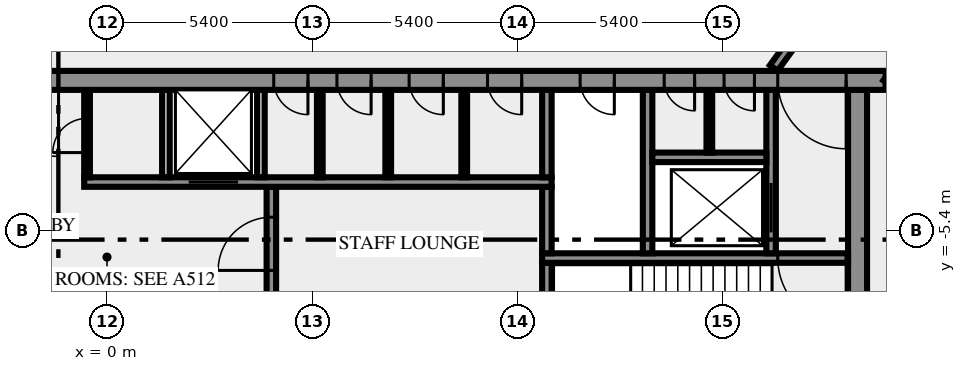
"""IFC4 building model, lengths in metres.
Left out: names, types, materials, properties, quantities, classifications, styles, units other than length and angle.
Written with IfcOpenShell. Run it as: python <this file> out.ifc"""

import sys

from ifc_helpers import new_model, si_unit, direction, frame, frame_2d, origin, place, context, subcontext, project, spatial, rectangle, extrude, element, fill, save


model = new_model("IFC4")
c1 = context("Model", 3, precision=1e-05, world=origin(), true_north=direction((0.0, 1.0)))
c2 = subcontext(c1, "Body", "Model", "MODEL_VIEW")
j1 = project(units=[si_unit("LENGTHUNIT", "METRE"), si_unit("PLANEANGLEUNIT", "RADIAN")], contexts=[c1])
p1 = place(None, origin())
s1 = spatial("IfcSite", under=j1, at=p1, CompositionType="ELEMENT")
p2 = place(p1, origin())
s2 = spatial("IfcBuilding", under=s1, at=p2, CompositionType="ELEMENT")
p3 = place(p2, frame((0.0, 0.0, 285.0)))
s3 = spatial("IfcBuildingStorey", under=s2, at=p3, CompositionType="ELEMENT", Elevation=285.0)
p4 = place(p3, frame((19.75, -10.5, 0.0), z_axis=(0.0, 0.0, 1.0), x_axis=(0.0, 1.0, 0.0)))
e1 = element("IfcWall", 1, at=p4, inside=s3, PredefinedType="SHEAR", context=c2, shape_type="SweptSolid", body=[
    extrude(rectangle(XDim=8.8, YDim=0.5, at=frame_2d((4.4, 0.0))), origin(), (0.0, 0.0, 1.0), 3.65),
])
p5 = place(p3, frame((4.325, -7.25, 0.0), z_axis=(0.0, 0.0, 1.0), x_axis=(0.0, 1.0, 0.0)))
e2 = element("IfcWall", 2, at=p5, inside=s3, PredefinedType="SHEAR", context=c2, shape_type="SweptSolid", body=[
    extrude(rectangle(XDim=3.0, YDim=0.25, at=frame_2d((1.5, 0.0))), origin(), (0.0, 0.0, 1.0), 3.65),
])
p6 = place(p5, frame((0.8, 0.0, 0.0)))
e3 = element("IfcOpeningElement", 3, at=p6, cuts=e2, PredefinedType="OPENING", context=c2, shape_type="SweptSolid", body=[
    extrude(rectangle(XDim=1.4, YDim=2.1, at=frame_2d((0.7, 1.05))), frame((0.0, 0.135, 0.0), z_axis=(0.0, -1.0, 0.0), x_axis=(1.0, 0.0, 0.0)), (0.0, 0.0, 1.0), 0.27),
])
p7 = place(p3, frame((11.575, -7.25, 0.0), z_axis=(0.0, 0.0, 1.0), x_axis=(0.0, 1.0, 0.0)))
e4 = element("IfcWall", 4, at=p7, inside=s3, PredefinedType="SHEAR", context=c2, shape_type="SweptSolid", body=[
    extrude(rectangle(XDim=1.0, YDim=0.25, at=frame_2d((0.5, 0.0))), origin(), (0.0, 0.0, 1.0), 3.65),
])
p8 = place(p3, frame((19.5, -6.125, 0.0), z_axis=(0.0, 0.0, 1.0), x_axis=(-1.0, 0.0, 0.0)))
e5 = element("IfcWall", 5, at=p8, inside=s3, PredefinedType="SHEAR", context=c2, shape_type="SweptSolid", body=[
    extrude(rectangle(XDim=8.05, YDim=0.25, at=frame_2d((4.025, 0.0))), origin(), (0.0, 0.0, 1.0), 3.65),
])
p9 = place(p8, frame((0.05, 0.0, 0.0)))
e6 = element("IfcOpeningElement", 6, at=p9, cuts=e5, PredefinedType="OPENING", context=c2, shape_type="SweptSolid", body=[
    extrude(rectangle(XDim=1.8, YDim=2.1, at=frame_2d((0.9, 1.05))), frame((0.0, 0.135, 0.0), z_axis=(0.0, -1.0, 0.0), x_axis=(1.0, 0.0, 0.0)), (0.0, 0.0, 1.0), 0.27),
])
p10 = place(p3, frame((11.575, -6.0, 0.0), z_axis=(0.0, 0.0, 1.0), x_axis=(0.0, 1.0, 0.0)))
e7 = element("IfcWall", 7, at=p10, inside=s3, PredefinedType="SHEAR", context=c2, shape_type="SweptSolid", body=[
    extrude(rectangle(XDim=1.75, YDim=0.25, at=frame_2d((0.875, 0.0))), origin(), (0.0, 0.0, 1.0), 3.65),
])
p11 = place(p3, frame((14.225, -6.0, 0.0), z_axis=(0.0, 0.0, 1.0), x_axis=(0.0, 1.0, 0.0)))
e8 = element("IfcWall", 8, at=p11, inside=s3, PredefinedType="SHEAR", context=c2, shape_type="SweptSolid", body=[
    extrude(rectangle(XDim=4.3, YDim=0.25, at=frame_2d((2.15, 0.0))), origin(), (0.0, 0.0, 1.0), 3.65),
])
p12 = place(p3, frame((17.475, -6.0, 0.0), z_axis=(0.0, 0.0, 1.0), x_axis=(0.0, 1.0, 0.0)))
e9 = element("IfcWall", 9, at=p12, inside=s3, PredefinedType="SHEAR", context=c2, shape_type="SweptSolid", body=[
    extrude(rectangle(XDim=4.3, YDim=0.25, at=frame_2d((2.15, 0.0))), origin(), (0.0, 0.0, 1.0), 3.65),
])
p13 = place(p12, frame((0.55, 0.0, 0.0)))
e10 = element("IfcOpeningElement", 10, at=p13, cuts=e9, PredefinedType="OPENING", context=c2, shape_type="SweptSolid", body=[
    extrude(rectangle(XDim=1.3, YDim=2.1, at=frame_2d((0.65, 1.05))), frame((0.0, 0.135, 0.0), z_axis=(0.0, -1.0, 0.0), x_axis=(1.0, 0.0, 0.0)), (0.0, 0.0, 1.0), 0.27),
])
p14 = place(p3, frame((-0.6, -4.125, 0.0), z_axis=(0.0, 0.0, 1.0), x_axis=(1.0, 0.0, 0.0)))
e11 = element("IfcWall", 11, at=p14, inside=s3, PredefinedType="SHEAR", context=c2, shape_type="SweptSolid", body=[
    extrude(rectangle(XDim=12.3, YDim=0.25, at=frame_2d((6.15, 0.0))), origin(), (0.0, 0.0, 1.0), 3.65),
])
p15 = place(p14, frame((2.75, 0.0, 0.0)))
e12 = element("IfcOpeningElement", 12, at=p15, cuts=e11, PredefinedType="OPENING", context=c2, shape_type="SweptSolid", body=[
    extrude(rectangle(XDim=1.3, YDim=2.1, at=frame_2d((0.65, 1.05))), frame((0.0, 0.135, 0.0), z_axis=(0.0, -1.0, 0.0), x_axis=(1.0, 0.0, 0.0)), (0.0, 0.0, 1.0), 0.27),
])
p16 = place(p3, frame((-0.525, -4.0, 0.0), z_axis=(0.0, 0.0, 1.0), x_axis=(0.0, 1.0, 0.0)))
e13 = element("IfcWall", 13, at=p16, inside=s3, PredefinedType="PARTITIONING", context=c2, shape_type="SweptSolid", body=[
    extrude(rectangle(XDim=2.3, YDim=0.15, at=frame_2d((1.15, 0.0))), origin(), (0.0, 0.0, 1.0), 3.65),
])
p17 = place(p16, frame((0.65, 0.0, 0.0)))
e14 = element("IfcOpeningElement", 14, at=p17, cuts=e13, PredefinedType="OPENING", context=c2, shape_type="SweptSolid", body=[
    extrude(rectangle(XDim=0.9, YDim=2.1, at=frame_2d((0.45, 1.05))), frame((0.0, 0.085, 0.0), z_axis=(0.0, -1.0, 0.0), x_axis=(1.0, 0.0, 0.0)), (0.0, 0.0, 1.0), 0.17),
])
for number, where, z_axis, x_axis in (
    (15, (1.55, -4.0, 0.0), (0.0, 0.0, 1.0), (0.0, 1.0, 0.0)),
    (16, (4.05, -4.0, 0.0), (0.0, 0.0, 1.0), (0.0, 1.0, 0.0)),
):
    element("IfcWall", number, at=place(p3, frame(where, z_axis=z_axis, x_axis=x_axis)), inside=s3, PredefinedType="SOLIDWALL", context=c2, shape_type="SweptSolid", body=[
        extrude(rectangle(XDim=2.3, YDim=0.2, at=frame_2d((1.15, 0.0))), origin(), (0.0, 0.0, 1.0), 3.65),
    ])
for number, where, z_axis, x_axis in (
    (17, (5.6, -4.0, 0.0), (0.0, 0.0, 1.0), (0.0, 1.0, 0.0)),
    (18, (7.4, -4.0, 0.0), (0.0, 0.0, 1.0), (0.0, 1.0, 0.0)),
    (19, (9.4, -4.0, 0.0), (0.0, 0.0, 1.0), (0.0, 1.0, 0.0)),
):
    element("IfcWall", number, at=place(p3, frame(where, z_axis=z_axis, x_axis=x_axis)), inside=s3, PredefinedType="PARTITIONING", context=c2, shape_type="SweptSolid", body=[
        extrude(rectangle(XDim=2.3, YDim=0.15, at=frame_2d((1.15, 0.0))), origin(), (0.0, 0.0, 1.0), 3.65),
    ])
p18 = place(p3, frame((11.575, -4.0, 0.0), z_axis=(0.0, 0.0, 1.0), x_axis=(0.0, 1.0, 0.0)))
e20 = element("IfcWall", 20, at=p18, inside=s3, PredefinedType="SHEAR", context=c2, shape_type="SweptSolid", body=[
    extrude(rectangle(XDim=2.3, YDim=0.25, at=frame_2d((1.15, 0.0))), origin(), (0.0, 0.0, 1.0), 3.65),
])
p19 = place(p3, frame((14.35, -3.475, 0.0), z_axis=(0.0, 0.0, 1.0), x_axis=(1.0, 0.0, 0.0)))
e21 = element("IfcWall", 21, at=p19, inside=s3, PredefinedType="SHEAR", context=c2, shape_type="SweptSolid", body=[
    extrude(rectangle(XDim=3.0, YDim=0.25, at=frame_2d((1.5, 0.0))), origin(), (0.0, 0.0, 1.0), 3.65),
])
p20 = place(p3, frame((15.85, -3.35, 0.0), z_axis=(0.0, 0.0, 1.0), x_axis=(0.0, 1.0, 0.0)))
e22 = element("IfcWall", 22, at=p20, inside=s3, PredefinedType="PARTITIONING", context=c2, shape_type="SweptSolid", body=[
    extrude(rectangle(XDim=1.65, YDim=0.15, at=frame_2d((0.825, 0.0))), origin(), (0.0, 0.0, 1.0), 3.65),
])
p21 = place(p3, frame((20.49, -1.45, 0.0), z_axis=(0.0, 0.0, 1.0), x_axis=(-1.0, 0.0, 0.0)))
e23 = element("IfcWall", 23, at=p21, inside=s3, PredefinedType="SHEAR", context=c2, shape_type="SweptSolid", body=[
    extrude(rectangle(XDim=40.98, YDim=0.5, at=frame_2d((20.49, 0.0))), origin(), (0.0, 0.0, 1.0), 3.65),
])
p22 = place(p21, frame((38.14, 0.0, 0.0)))
e24 = element("IfcOpeningElement", 24, at=p22, cuts=e23, PredefinedType="OPENING", context=c2, shape_type="SweptSolid", body=[
    extrude(rectangle(XDim=1.8, YDim=2.1, at=frame_2d((0.9, 1.05))), frame((0.0, 0.26, 0.0), z_axis=(0.0, -1.0, 0.0), x_axis=(1.0, 0.0, 0.0)), (0.0, 0.0, 1.0), 0.52),
])
p23 = place(p21, frame((35.89, 0.0, 0.0)))
e25 = element("IfcOpeningElement", 25, at=p23, cuts=e23, PredefinedType="OPENING", context=c2, shape_type="SweptSolid", body=[
    extrude(rectangle(XDim=0.9, YDim=2.1, at=frame_2d((0.45, 1.05))), frame((0.0, 0.26, 0.0), z_axis=(0.0, -1.0, 0.0), x_axis=(1.0, 0.0, 0.0)), (0.0, 0.0, 1.0), 0.52),
])
p24 = place(p21, frame((32.94, 0.0, 0.0)))
e26 = element("IfcOpeningElement", 26, at=p24, cuts=e23, PredefinedType="OPENING", context=c2, shape_type="SweptSolid", body=[
    extrude(rectangle(XDim=0.9, YDim=2.1, at=frame_2d((0.45, 1.05))), frame((0.0, 0.26, 0.0), z_axis=(0.0, -1.0, 0.0), x_axis=(1.0, 0.0, 0.0)), (0.0, 0.0, 1.0), 0.52),
])
p25 = place(p21, frame((31.015, 0.0, 0.0)))
e27 = element("IfcOpeningElement", 27, at=p25, cuts=e23, PredefinedType="OPENING", context=c2, shape_type="SweptSolid", body=[
    extrude(rectangle(XDim=0.8, YDim=2.1, at=frame_2d((0.4, 1.05))), frame((0.0, 0.26, 0.0), z_axis=(0.0, -1.0, 0.0), x_axis=(1.0, 0.0, 0.0)), (0.0, 0.0, 1.0), 0.52),
])
p26 = place(p21, frame((24.765, 0.0, 0.0)))
e28 = element("IfcOpeningElement", 28, at=p26, cuts=e23, PredefinedType="OPENING", context=c2, shape_type="SweptSolid", body=[
    extrude(rectangle(XDim=0.8, YDim=2.1, at=frame_2d((0.4, 1.05))), frame((0.0, 0.26, 0.0), z_axis=(0.0, -1.0, 0.0), x_axis=(1.0, 0.0, 0.0)), (0.0, 0.0, 1.0), 0.52),
])
p27 = place(p21, frame((21.765, 0.0, 0.0)))
e29 = element("IfcOpeningElement", 29, at=p27, cuts=e23, PredefinedType="OPENING", context=c2, shape_type="SweptSolid", body=[
    extrude(rectangle(XDim=2.0, YDim=2.1, at=frame_2d((1.0, 1.05))), frame((0.0, 0.26, 0.0), z_axis=(0.0, -1.0, 0.0), x_axis=(1.0, 0.0, 0.0)), (0.0, 0.0, 1.0), 0.52),
])
p28 = place(p21, frame((15.202, 0.0, 0.0)))
e30 = element("IfcOpeningElement", 30, at=p28, cuts=e23, PredefinedType="OPENING", context=c2, shape_type="SweptSolid", body=[
    extrude(rectangle(XDim=0.9, YDim=2.1, at=frame_2d((0.45, 1.05))), frame((0.0, 0.26, 0.0), z_axis=(0.0, -1.0, 0.0), x_axis=(1.0, 0.0, 0.0)), (0.0, 0.0, 1.0), 0.52),
])
p29 = place(p21, frame((13.54, 0.0, 0.0)))
e31 = element("IfcOpeningElement", 31, at=p29, cuts=e23, PredefinedType="OPENING", context=c2, shape_type="SweptSolid", body=[
    extrude(rectangle(XDim=0.9, YDim=2.1, at=frame_2d((0.45, 1.05))), frame((0.0, 0.26, 0.0), z_axis=(0.0, -1.0, 0.0), x_axis=(1.0, 0.0, 0.0)), (0.0, 0.0, 1.0), 0.52),
])
p30 = place(p21, frame((11.64, 0.0, 0.0)))
e32 = element("IfcOpeningElement", 32, at=p30, cuts=e23, PredefinedType="OPENING", context=c2, shape_type="SweptSolid", body=[
    extrude(rectangle(XDim=0.9, YDim=2.1, at=frame_2d((0.45, 1.05))), frame((0.0, 0.26, 0.0), z_axis=(0.0, -1.0, 0.0), x_axis=(1.0, 0.0, 0.0)), (0.0, 0.0, 1.0), 0.52),
])
p31 = place(p21, frame((9.577, 0.0, 0.0)))
e33 = element("IfcOpeningElement", 33, at=p31, cuts=e23, PredefinedType="OPENING", context=c2, shape_type="SweptSolid", body=[
    extrude(rectangle(XDim=0.9, YDim=2.1, at=frame_2d((0.45, 1.05))), frame((0.0, 0.26, 0.0), z_axis=(0.0, -1.0, 0.0), x_axis=(1.0, 0.0, 0.0)), (0.0, 0.0, 1.0), 0.52),
])
p32 = place(p21, frame((7.14, 0.0, 0.0)))
e34 = element("IfcOpeningElement", 34, at=p32, cuts=e23, PredefinedType="OPENING", context=c2, shape_type="SweptSolid", body=[
    extrude(rectangle(XDim=0.9, YDim=2.1, at=frame_2d((0.45, 1.05))), frame((0.0, 0.26, 0.0), z_axis=(0.0, -1.0, 0.0), x_axis=(1.0, 0.0, 0.0)), (0.0, 0.0, 1.0), 0.52),
])
p33 = place(p21, frame((5.028, 0.0, 0.0)))
e35 = element("IfcOpeningElement", 35, at=p33, cuts=e23, PredefinedType="OPENING", context=c2, shape_type="SweptSolid", body=[
    extrude(rectangle(XDim=0.8, YDim=2.1, at=frame_2d((0.4, 1.05))), frame((0.0, 0.26, 0.0), z_axis=(0.0, -1.0, 0.0), x_axis=(1.0, 0.0, 0.0)), (0.0, 0.0, 1.0), 0.52),
])
p34 = place(p21, frame((3.452, 0.0, 0.0)))
e36 = element("IfcOpeningElement", 36, at=p34, cuts=e23, PredefinedType="OPENING", context=c2, shape_type="SweptSolid", body=[
    extrude(rectangle(XDim=0.8, YDim=2.1, at=frame_2d((0.4, 1.05))), frame((0.0, 0.26, 0.0), z_axis=(0.0, -1.0, 0.0), x_axis=(1.0, 0.0, 0.0)), (0.0, 0.0, 1.0), 0.52),
])
p35 = place(p21, frame((1.04, 0.0, 0.0)))
e37 = element("IfcOpeningElement", 37, at=p35, cuts=e23, PredefinedType="OPENING", context=c2, shape_type="SweptSolid", body=[
    extrude(rectangle(XDim=1.8, YDim=2.1, at=frame_2d((0.9, 1.05))), frame((0.0, 0.26, 0.0), z_axis=(0.0, -1.0, 0.0), x_axis=(1.0, 0.0, 0.0)), (0.0, 0.0, 1.0), 0.52),
])
p36 = place(p3, frame((17.545, -1.125, 0.0), z_axis=(0.0, 0.0, 1.0), x_axis=(0.58779555165, 0.809009511354, 0.0)))
e38 = element("IfcWall", 38, at=p36, inside=s3, PredefinedType="SOLIDWALL", context=c2, shape_type="SweptSolid", body=[
    extrude(rectangle(XDim=18.103, YDim=0.25, at=frame_2d((9.052, 0.0))), origin(), (0.0, 0.0, 1.0), 3.65),
])
p37 = place(p36, frame((3.441, 0.0, 0.0)))
e39 = element("IfcOpeningElement", 39, at=p37, cuts=e38, PredefinedType="OPENING", context=c2, shape_type="SweptSolid", body=[
    extrude(rectangle(XDim=0.9, YDim=2.1, at=frame_2d((0.45, 1.05))), frame((0.0, 0.135, 0.0), z_axis=(0.0, -1.0, 0.0), x_axis=(1.0, 0.0, 0.0)), (0.0, 0.0, 1.0), 0.27),
])
p38 = place(p3, frame((30.183, 11.761, 0.0), z_axis=(0.0, 0.0, 1.0), x_axis=(-0.587781762867, -0.80901952958, 0.0)))
e40 = element("IfcWall", 40, at=p38, inside=s3, PredefinedType="SOLIDWALL", context=c2, shape_type="SweptSolid", body=[
    extrude(rectangle(XDim=16.42, YDim=0.25, at=frame_2d((8.21, 0.0))), origin(), (0.0, 0.0, 1.0), 3.65),
])
p39 = place(p38, frame((0.225, 0.0, 0.0)))
e41 = element("IfcOpeningElement", 41, at=p39, cuts=e40, PredefinedType="OPENING", context=c2, shape_type="SweptSolid", body=[
    extrude(rectangle(XDim=0.9, YDim=2.1, at=frame_2d((0.45, 1.05))), frame((0.0, 0.135, 0.0), z_axis=(0.0, -1.0, 0.0), x_axis=(1.0, 0.0, 0.0)), (0.0, 0.0, 1.0), 0.27),
])
p40 = place(p6, origin())
e42 = element("IfcDoor", 42, at=p40, inside=s3, OperationType="DOUBLE_DOOR_SINGLE_SWING", PredefinedType="DOOR", context=c2, shape_type="SweptSolid", body=[
    extrude(rectangle(XDim=1.4, YDim=2.1, at=frame_2d((0.7, 1.05))), frame((0.0, 0.025, 0.0), z_axis=(0.0, -1.0, 0.0), x_axis=(1.0, 0.0, 0.0)), (0.0, 0.0, 1.0), 0.05),
])
fill(e3, e42)
p41 = place(p9, origin())
e43 = element("IfcDoor", 43, at=p41, inside=s3, OperationType="DOUBLE_DOOR_SINGLE_SWING", PredefinedType="DOOR", context=c2, shape_type="SweptSolid", body=[
    extrude(rectangle(XDim=1.8, YDim=2.1, at=frame_2d((0.9, 1.05))), frame((0.0, 0.025, 0.0), z_axis=(0.0, -1.0, 0.0), x_axis=(1.0, 0.0, 0.0)), (0.0, 0.0, 1.0), 0.05),
])
fill(e6, e43)
p42 = place(p13, origin())
e44 = element("IfcDoor", 44, at=p42, inside=s3, OperationType="DOUBLE_DOOR_SLIDING", PredefinedType="DOOR", context=c2, shape_type="SweptSolid", body=[
    extrude(rectangle(XDim=1.3, YDim=2.1, at=frame_2d((0.65, 1.05))), frame((0.0, 0.025, 0.0), z_axis=(0.0, -1.0, 0.0), x_axis=(1.0, 0.0, 0.0)), (0.0, 0.0, 1.0), 0.05),
])
fill(e10, e44)
p43 = place(p15, origin())
e45 = element("IfcDoor", 45, at=p43, inside=s3, OperationType="DOUBLE_DOOR_SLIDING", PredefinedType="DOOR", context=c2, shape_type="SweptSolid", body=[
    extrude(rectangle(XDim=1.3, YDim=2.1, at=frame_2d((0.65, 1.05))), frame((0.0, 0.025, 0.0), z_axis=(0.0, -1.0, 0.0), x_axis=(1.0, 0.0, 0.0)), (0.0, 0.0, 1.0), 0.05),
])
fill(e12, e45)
p44 = place(p17, origin())
e46 = element("IfcDoor", 46, at=p44, inside=s3, OperationType="SINGLE_SWING_LEFT", PredefinedType="DOOR", context=c2, shape_type="SweptSolid", body=[
    extrude(rectangle(XDim=0.9, YDim=2.1, at=frame_2d((0.45, 1.05))), frame((0.0, 0.025, 0.0), z_axis=(0.0, -1.0, 0.0), x_axis=(1.0, 0.0, 0.0)), (0.0, 0.0, 1.0), 0.05),
])
fill(e14, e46)
p45 = place(p27, origin())
e47 = element("IfcDoor", 47, at=p45, inside=s3, OperationType="DOUBLE_DOOR_SINGLE_SWING", PredefinedType="DOOR", context=c2, shape_type="SweptSolid", body=[
    extrude(rectangle(XDim=2.0, YDim=2.1, at=frame_2d((1.0, 1.05))), frame((0.0, 0.025, 0.0), z_axis=(0.0, -1.0, 0.0), x_axis=(1.0, 0.0, 0.0)), (0.0, 0.0, 1.0), 0.05),
])
fill(e29, e47)
p46 = place(p28, origin())
e48 = element("IfcDoor", 48, at=p46, inside=s3, OperationType="SINGLE_SWING_LEFT", PredefinedType="DOOR", context=c2, shape_type="SweptSolid", body=[
    extrude(rectangle(XDim=0.9, YDim=2.1, at=frame_2d((0.45, 1.05))), frame((0.0, 0.025, 0.0), z_axis=(0.0, -1.0, 0.0), x_axis=(1.0, 0.0, 0.0)), (0.0, 0.0, 1.0), 0.05),
])
fill(e30, e48)
p47 = place(p29, origin())
e49 = element("IfcDoor", 49, at=p47, inside=s3, OperationType="SINGLE_SWING_LEFT", PredefinedType="DOOR", context=c2, shape_type="SweptSolid", body=[
    extrude(rectangle(XDim=0.9, YDim=2.1, at=frame_2d((0.45, 1.05))), frame((0.0, 0.025, 0.0), z_axis=(0.0, -1.0, 0.0), x_axis=(1.0, 0.0, 0.0)), (0.0, 0.0, 1.0), 0.05),
])
fill(e31, e49)
p48 = place(p30, origin())
e50 = element("IfcDoor", 50, at=p48, inside=s3, OperationType="SINGLE_SWING_LEFT", PredefinedType="DOOR", context=c2, shape_type="SweptSolid", body=[
    extrude(rectangle(XDim=0.9, YDim=2.1, at=frame_2d((0.45, 1.05))), frame((0.0, 0.025, 0.0), z_axis=(0.0, -1.0, 0.0), x_axis=(1.0, 0.0, 0.0)), (0.0, 0.0, 1.0), 0.05),
])
fill(e32, e50)
p49 = place(p31, origin())
e51 = element("IfcDoor", 51, at=p49, inside=s3, OperationType="SINGLE_SWING_LEFT", PredefinedType="DOOR", context=c2, shape_type="SweptSolid", body=[
    extrude(rectangle(XDim=0.9, YDim=2.1, at=frame_2d((0.45, 1.05))), frame((0.0, 0.025, 0.0), z_axis=(0.0, -1.0, 0.0), x_axis=(1.0, 0.0, 0.0)), (0.0, 0.0, 1.0), 0.05),
])
fill(e33, e51)
p50 = place(p32, origin())
e52 = element("IfcDoor", 52, at=p50, inside=s3, OperationType="SINGLE_SWING_LEFT", PredefinedType="DOOR", context=c2, shape_type="SweptSolid", body=[
    extrude(rectangle(XDim=0.9, YDim=2.1, at=frame_2d((0.45, 1.05))), frame((0.0, 0.025, 0.0), z_axis=(0.0, -1.0, 0.0), x_axis=(1.0, 0.0, 0.0)), (0.0, 0.0, 1.0), 0.05),
])
fill(e34, e52)
p51 = place(p33, origin())
e53 = element("IfcDoor", 53, at=p51, inside=s3, OperationType="SINGLE_SWING_LEFT", PredefinedType="DOOR", context=c2, shape_type="SweptSolid", body=[
    extrude(rectangle(XDim=0.8, YDim=2.1, at=frame_2d((0.4, 1.05))), frame((0.0, 0.025, 0.0), z_axis=(0.0, -1.0, 0.0), x_axis=(1.0, 0.0, 0.0)), (0.0, 0.0, 1.0), 0.05),
])
fill(e35, e53)
p52 = place(p34, origin())
e54 = element("IfcDoor", 54, at=p52, inside=s3, OperationType="SINGLE_SWING_LEFT", PredefinedType="DOOR", context=c2, shape_type="SweptSolid", body=[
    extrude(rectangle(XDim=0.8, YDim=2.1, at=frame_2d((0.4, 1.05))), frame((0.0, 0.025, 0.0), z_axis=(0.0, -1.0, 0.0), x_axis=(1.0, 0.0, 0.0)), (0.0, 0.0, 1.0), 0.05),
])
fill(e36, e54)
p53 = place(p35, origin())
e55 = element("IfcDoor", 55, at=p53, inside=s3, OperationType="DOUBLE_DOOR_SINGLE_SWING", PredefinedType="DOOR", context=c2, shape_type="SweptSolid", body=[
    extrude(rectangle(XDim=1.8, YDim=2.1, at=frame_2d((0.9, 1.05))), frame((0.0, 0.025, 0.0), z_axis=(0.0, -1.0, 0.0), x_axis=(1.0, 0.0, 0.0)), (0.0, 0.0, 1.0), 0.05),
])
fill(e37, e55)
save(model, sys.argv[1])
